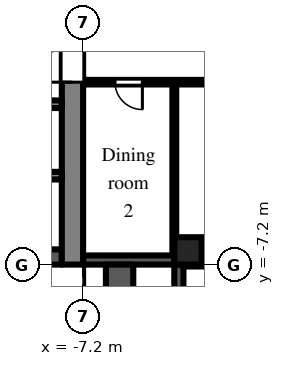
"""IFC4 building model, lengths in metres.
Left out: names, types, materials, properties, quantities, classifications, styles, units other than length and angle.
Written with IfcOpenShell. Run it as: python <this file> out.ifc"""

import sys

from ifc_helpers import new_model, si_unit, direction, frame, frame_2d, origin, origin_2d, place, context, subcontext, project, spatial, rectangle, extrude, element, fill, save


model = new_model("IFC4")
c1 = context("Model", 3, precision=1e-05, world=origin(), true_north=direction((0.0, 1.0)))
c2 = subcontext(c1, "Body", "Model", "MODEL_VIEW")
j1 = project(units=[si_unit("LENGTHUNIT", "METRE"), si_unit("PLANEANGLEUNIT", "RADIAN")], contexts=[c1])
p1 = place(None, origin())
s1 = spatial("IfcSite", under=j1, at=p1, CompositionType="ELEMENT")
p2 = place(p1, origin())
s2 = spatial("IfcBuilding", under=s1, at=p2, CompositionType="ELEMENT")
p3 = place(p2, frame((0.0, 0.0, 11.7)))
s3 = spatial("IfcBuildingStorey", under=s2, at=p3, CompositionType="ELEMENT", Elevation=11.7)
p4 = place(p3, frame((-3.75, -6.75, 0.0), z_axis=(0.0, 0.0, 1.0), x_axis=(1.0, 0.0, 0.0)))
e1 = element("IfcColumn", 1, at=p4, inside=s3, PredefinedType="COLUMN", context=c2, shape_type="SweptSolid", body=[
    extrude(rectangle(XDim=0.9, YDim=0.9, at=origin_2d()), origin(), (0.0, 0.0, 1.0), 3.0),
])
p5 = place(p3, frame((-7.2, -7.05, 0.0), z_axis=(0.0, 0.0, 1.0), x_axis=(1.0, 0.0, 0.0)))
e2 = element("IfcWall", 2, at=p5, inside=s3, PredefinedType="SOLIDWALL", context=c2, shape_type="SweptSolid", body=[
    extrude(rectangle(XDim=3.0, YDim=0.3, at=frame_2d((1.5, 0.0))), origin(), (0.0, 0.0, 1.0), 2.1),
])
p6 = place(p3, frame((-4.05, -7.2, 0.0), z_axis=(0.0, 0.0, 1.0), x_axis=(0.0, -1.0, 0.0)))
e3 = element("IfcWall", 3, at=p6, inside=s3, PredefinedType="SOLIDWALL", context=c2, shape_type="SweptSolid", body=[
    extrude(rectangle(XDim=7.2, YDim=0.3, at=frame_2d((3.6, 0.0))), origin(), (0.0, 0.0, 1.0), 2.1),
])
p7 = place(p6, frame((3.0, 0.0, 0.0)))
e4 = element("IfcOpeningElement", 4, at=p7, cuts=e3, PredefinedType="OPENING", context=c2, shape_type="SweptSolid", body=[
    extrude(rectangle(XDim=1.2, YDim=2.05, at=frame_2d((0.6, 1.025))), frame((0.0, 0.16, 0.0), z_axis=(0.0, -1.0, 0.0), x_axis=(1.0, 0.0, 0.0)), (0.0, 0.0, 1.0), 0.32),
])
p8 = place(p6, frame((0.9, 0.0, 0.2)))
e5 = element("IfcOpeningElement", 5, at=p8, cuts=e3, PredefinedType="OPENING", context=c2, shape_type="SweptSolid", body=[
    extrude(rectangle(XDim=1.8, YDim=1.85, at=frame_2d((0.9, 0.925))), frame((0.0, 0.16, 0.0), z_axis=(0.0, -1.0, 0.0), x_axis=(1.0, 0.0, 0.0)), (0.0, 0.0, 1.0), 0.32),
])
p9 = place(p6, frame((4.5, 0.0, 0.2)))
e6 = element("IfcOpeningElement", 6, at=p9, cuts=e3, PredefinedType="OPENING", context=c2, shape_type="SweptSolid", body=[
    extrude(rectangle(XDim=1.8, YDim=1.85, at=frame_2d((0.9, 0.925))), frame((0.0, 0.16, 0.0), z_axis=(0.0, -1.0, 0.0), x_axis=(1.0, 0.0, 0.0)), (0.0, 0.0, 1.0), 0.32),
])
p10 = place(p3, frame((-6.0, -14.4, 0.0), z_axis=(0.0, 0.0, 1.0), x_axis=(0.0, 1.0, 0.0)))
e7 = element("IfcWall", 7, at=p10, inside=s3, PredefinedType="PARAPET", context=c2, shape_type="SweptSolid", body=[
    extrude(rectangle(XDim=7.2, YDim=0.9, at=frame_2d((3.6, 0.0))), origin(), (0.0, 0.0, 1.0), 0.8),
])
p11 = place(p3, frame((-7.55, -7.2, 0.0), z_axis=(0.0, 0.0, 1.0), x_axis=(0.0, 1.0, 0.0)))
e8 = element("IfcWall", 8, at=p11, inside=s3, PredefinedType="SHEAR", context=c2, shape_type="SweptSolid", body=[
    extrude(rectangle(XDim=14.4, YDim=0.7, at=frame_2d((7.2, 0.0))), origin(), (0.0, 0.0, 1.0), 2.575),
])
p12 = place(p11, frame((6.0, 0.0, 0.0)))
e9 = element("IfcOpeningElement", 9, at=p12, cuts=e8, PredefinedType="OPENING", context=c2, shape_type="SweptSolid", body=[
    extrude(rectangle(XDim=2.4, YDim=2.2, at=frame_2d((1.2, 1.1))), frame((0.0, 0.36, 0.0), z_axis=(0.0, -1.0, 0.0), x_axis=(1.0, 0.0, 0.0)), (0.0, 0.0, 1.0), 0.72),
])
p13 = place(p3, frame((-7.9, -6.95, 0.0), z_axis=(0.0, 0.0, 1.0), x_axis=(-1.0, 0.0, 0.0)))
e10 = element("IfcWall", 10, at=p13, inside=s3, PredefinedType="SHEAR", context=c2, shape_type="SweptSolid", body=[
    extrude(rectangle(XDim=12.95, YDim=0.5, at=frame_2d((6.475, 0.0))), origin(), (0.0, 0.0, 1.0), 2.575),
])
p14 = place(p3, frame((-7.9, -1.925, 0.0), z_axis=(0.0, 0.0, 1.0), x_axis=(-1.0, 0.0, 0.0)))
e11 = element("IfcWall", 11, at=p14, inside=s3, PredefinedType="SHEAR", context=c2, shape_type="SweptSolid", body=[
    extrude(rectangle(XDim=12.95, YDim=0.25, at=frame_2d((6.475, 0.0))), origin(), (0.0, 0.0, 1.0), 2.575),
])
p15 = place(p14, frame((4.825, 0.0, 0.0)))
e12 = element("IfcOpeningElement", 12, at=p15, cuts=e11, PredefinedType="OPENING", context=c2, shape_type="SweptSolid", body=[
    extrude(rectangle(XDim=1.1, YDim=2.1, at=frame_2d((0.55, 1.05))), frame((0.0, 0.135, 0.0), z_axis=(0.0, -1.0, 0.0), x_axis=(1.0, 0.0, 0.0)), (0.0, 0.0, 1.0), 0.27),
])
p16 = place(p14, frame((7.025, 0.0, 0.0)))
e13 = element("IfcOpeningElement", 13, at=p16, cuts=e11, PredefinedType="OPENING", context=c2, shape_type="SweptSolid", body=[
    extrude(rectangle(XDim=1.1, YDim=2.1, at=frame_2d((0.55, 1.05))), frame((0.0, 0.135, 0.0), z_axis=(0.0, -1.0, 0.0), x_axis=(1.0, 0.0, 0.0)), (0.0, 0.0, 1.0), 0.27),
])
p17 = place(p14, frame((9.225, 0.0, 0.0)))
e14 = element("IfcOpeningElement", 14, at=p17, cuts=e11, PredefinedType="OPENING", context=c2, shape_type="SweptSolid", body=[
    extrude(rectangle(XDim=1.1, YDim=2.1, at=frame_2d((0.55, 1.05))), frame((0.0, 0.135, 0.0), z_axis=(0.0, -1.0, 0.0), x_axis=(1.0, 0.0, 0.0)), (0.0, 0.0, 1.0), 0.27),
])
p18 = place(p14, frame((0.525, 0.0, 0.0)))
e15 = element("IfcOpeningElement", 15, at=p18, cuts=e11, PredefinedType="OPENING", context=c2, shape_type="SweptSolid", body=[
    extrude(rectangle(XDim=0.9, YDim=2.1, at=frame_2d((0.45, 1.05))), frame((0.0, 0.135, 0.0), z_axis=(0.0, -1.0, 0.0), x_axis=(1.0, 0.0, 0.0)), (0.0, 0.0, 1.0), 0.27),
])
p19 = place(p14, frame((2.625, 0.0, 0.0)))
e16 = element("IfcOpeningElement", 16, at=p19, cuts=e11, PredefinedType="OPENING", context=c2, shape_type="SweptSolid", body=[
    extrude(rectangle(XDim=1.1, YDim=2.1, at=frame_2d((0.55, 1.05))), frame((0.0, 0.135, 0.0), z_axis=(0.0, -1.0, 0.0), x_axis=(1.0, 0.0, 0.0)), (0.0, 0.0, 1.0), 0.27),
])
p20 = place(p3, frame((-7.9, -4.275, 0.0), z_axis=(0.0, 0.0, 1.0), x_axis=(-1.0, 0.0, 0.0)))
e17 = element("IfcWall", 17, at=p20, inside=s3, PredefinedType="SHEAR", context=c2, shape_type="SweptSolid", body=[
    extrude(rectangle(XDim=1.95, YDim=0.25, at=frame_2d((0.975, 0.0))), origin(), (0.0, 0.0, 1.0), 2.575),
])
p21 = place(p3, frame((-7.2, -1.2, 0.0), z_axis=(0.0, 0.0, 1.0), x_axis=(1.0, 0.0, 0.0)))
e18 = element("IfcWall", 18, at=p21, inside=s3, PredefinedType="PARTITIONING", context=c2, shape_type="SweptSolid", body=[
    extrude(rectangle(XDim=5.925, YDim=0.15, at=frame_2d((2.962, 0.0))), origin(), (0.0, 0.0, 1.0), 2.575),
])
p22 = place(p21, frame((1.05, 0.0, 0.0)))
e19 = element("IfcOpeningElement", 19, at=p22, cuts=e18, PredefinedType="OPENING", context=c2, shape_type="SweptSolid", body=[
    extrude(rectangle(XDim=0.9, YDim=2.1, at=frame_2d((0.45, 1.05))), frame((0.0, 0.085, 0.0), z_axis=(0.0, -1.0, 0.0), x_axis=(1.0, 0.0, 0.0)), (0.0, 0.0, 1.0), 0.17),
])
p23 = place(p3, frame((-4.2, -6.9, 0.0), z_axis=(0.0, 0.0, 1.0), x_axis=(0.0, 1.0, 0.0)))
e20 = element("IfcWall", 20, at=p23, inside=s3, PredefinedType="PARTITIONING", context=c2, shape_type="SweptSolid", body=[
    extrude(rectangle(XDim=5.625, YDim=0.125, at=frame_2d((2.812, 0.0))), origin(), (0.0, 0.0, 1.0), 2.575),
])
p24 = place(p3, frame((-3.9, -7.2, 0.0), z_axis=(0.0, 0.0, 1.0), x_axis=(1.0, 0.0, 0.0)))
e21 = element("IfcWall", 21, at=p24, inside=s3, PredefinedType="PARTITIONING", context=c2, shape_type="SweptSolid", body=[
    extrude(rectangle(XDim=2.625, YDim=0.125, at=frame_2d((1.312, 0.0))), origin(), (0.0, 0.0, 1.0), 2.575),
])
p25 = place(p12, origin())
e22 = element("IfcDoor", 22, at=p25, inside=s3, OperationType="DOUBLE_DOOR_DOUBLE_SWING", PredefinedType="DOOR", context=c2, shape_type="SweptSolid", body=[
    extrude(rectangle(XDim=2.4, YDim=2.2, at=frame_2d((1.2, 1.1))), frame((0.0, 0.025, 0.0), z_axis=(0.0, -1.0, 0.0), x_axis=(1.0, 0.0, 0.0)), (0.0, 0.0, 1.0), 0.05),
])
fill(e9, e22)
p26 = place(p22, frame((0.9, 0.0, 0.0), z_axis=(0.0, 0.0, 1.0), x_axis=(-1.0, 0.0, 0.0)))
e23 = element("IfcDoor", 23, at=p26, inside=s3, OperationType="SINGLE_SWING_LEFT", PredefinedType="DOOR", context=c2, shape_type="SweptSolid", body=[
    extrude(rectangle(XDim=0.9, YDim=2.1, at=frame_2d((0.45, 1.05))), frame((0.0, 0.025, 0.0), z_axis=(0.0, -1.0, 0.0), x_axis=(1.0, 0.0, 0.0)), (0.0, 0.0, 1.0), 0.05),
])
fill(e19, e23)
save(model, sys.argv[1])
